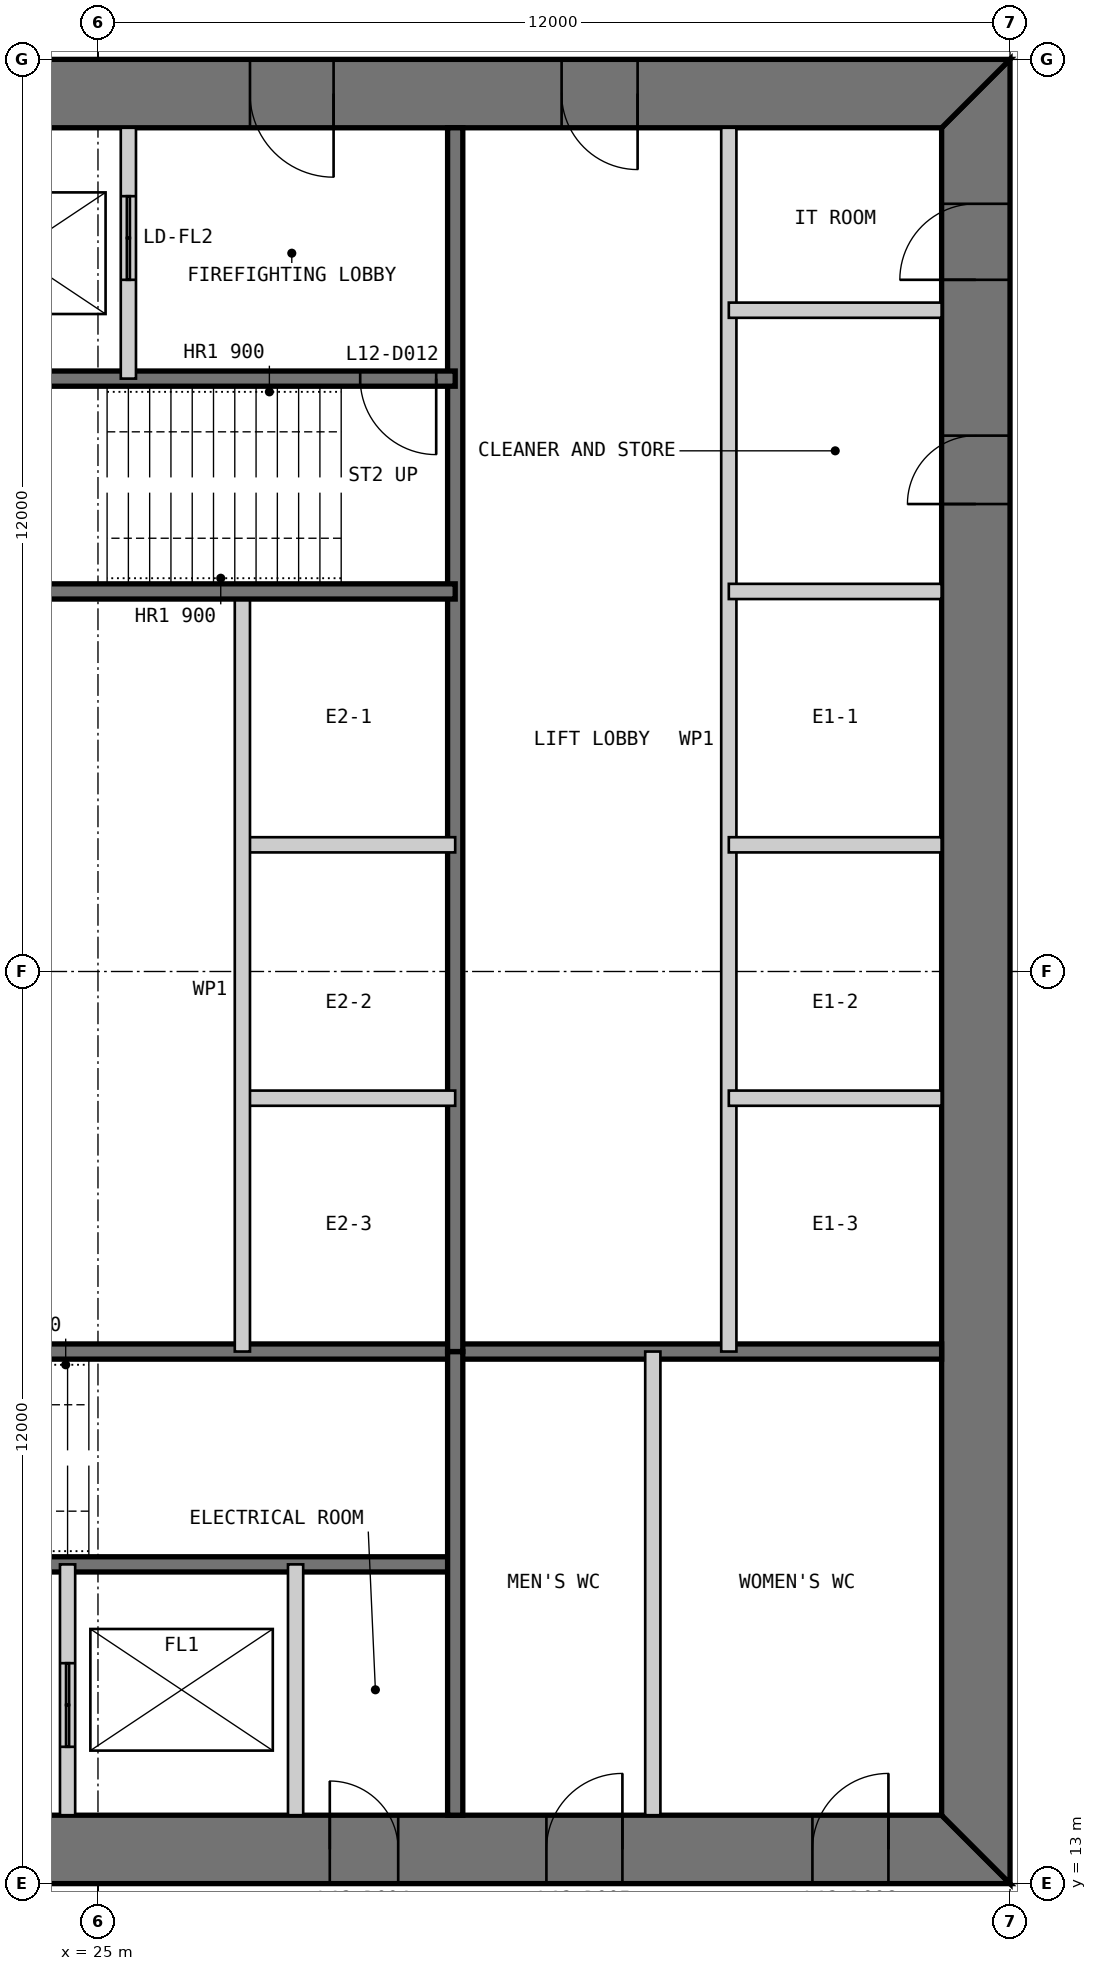
"""IFC4 building model, lengths in metres.
Left out: names, types, materials, properties, quantities, classifications, styles, units other than length and angle.
Written with IfcOpenShell. Run it as: python <this file> out.ifc"""

import sys

from ifc_helpers import new_model, si_unit, direction, frame, frame_2d, origin, place, context, subcontext, project, spatial, polyline, rectangle, outline, extrude, element, fill, save


model = new_model("IFC4")
c1 = context("Model", 3, precision=1e-05, world=origin(), true_north=direction((0.0, 1.0)))
c2 = subcontext(c1, "Body", "Model", "MODEL_VIEW")
j1 = project(units=[si_unit("LENGTHUNIT", "METRE"), si_unit("PLANEANGLEUNIT", "RADIAN")], contexts=[c1])
p1 = place(None, origin())
s1 = spatial("IfcSite", under=j1, at=p1, CompositionType="ELEMENT")
p2 = place(p1, origin())
s2 = spatial("IfcBuilding", under=s1, at=p2, CompositionType="ELEMENT")
p3 = place(p2, frame((0.0, 0.0, 55.0)))
s3 = spatial("IfcBuildingStorey", under=s2, at=p3, CompositionType="ELEMENT", Elevation=55.0)
p4 = place(p3, frame((13.0, 13.45, 0.0), z_axis=(0.0, 0.0, 1.0), x_axis=(1.0, 0.0, 0.0)))
e1 = element("IfcWall", 1, at=p4, inside=s3, PredefinedType="SHEAR", context=c2, shape_type="SweptSolid", body=[
    extrude(outline(polyline([(0.0, -0.45), (24.0, -0.45), (23.1, 0.45), (0.9, 0.45), (0.0, -0.45)])), origin(), (0.0, 0.0, 1.0), 4.0),
])
p5 = place(p4, frame((4.9, 0.0, 0.0)))
e2 = element("IfcOpeningElement", 2, at=p5, cuts=e1, PredefinedType="OPENING", context=c2, shape_type="SweptSolid", body=[
    extrude(rectangle(XDim=1.0, YDim=2.2, at=frame_2d((0.5, 1.1))), frame((0.0, 0.46, 0.0), z_axis=(0.0, -1.0, 0.0), x_axis=(1.0, 0.0, 0.0)), (0.0, 0.0, 1.0), 0.92),
])
p6 = place(p4, frame((8.9, 0.0, 0.0)))
e3 = element("IfcOpeningElement", 3, at=p6, cuts=e1, PredefinedType="OPENING", context=c2, shape_type="SweptSolid", body=[
    extrude(rectangle(XDim=1.1, YDim=2.2, at=frame_2d((0.55, 1.1))), frame((0.0, 0.46, 0.0), z_axis=(0.0, -1.0, 0.0), x_axis=(1.0, 0.0, 0.0)), (0.0, 0.0, 1.0), 0.92),
])
p7 = place(p4, frame((15.05, 0.0, 0.0)))
e4 = element("IfcOpeningElement", 4, at=p7, cuts=e1, PredefinedType="OPENING", context=c2, shape_type="SweptSolid", body=[
    extrude(rectangle(XDim=0.9, YDim=2.2, at=frame_2d((0.45, 1.1))), frame((0.0, 0.46, 0.0), z_axis=(0.0, -1.0, 0.0), x_axis=(1.0, 0.0, 0.0)), (0.0, 0.0, 1.0), 0.92),
])
p8 = place(p4, frame((17.9, 0.0, 0.0)))
e5 = element("IfcOpeningElement", 5, at=p8, cuts=e1, PredefinedType="OPENING", context=c2, shape_type="SweptSolid", body=[
    extrude(rectangle(XDim=1.0, YDim=2.2, at=frame_2d((0.5, 1.1))), frame((0.0, 0.46, 0.0), z_axis=(0.0, -1.0, 0.0), x_axis=(1.0, 0.0, 0.0)), (0.0, 0.0, 1.0), 0.92),
])
p9 = place(p4, frame((21.4, 0.0, 0.0)))
e6 = element("IfcOpeningElement", 6, at=p9, cuts=e1, PredefinedType="OPENING", context=c2, shape_type="SweptSolid", body=[
    extrude(rectangle(XDim=1.0, YDim=2.2, at=frame_2d((0.5, 1.1))), frame((0.0, 0.46, 0.0), z_axis=(0.0, -1.0, 0.0), x_axis=(1.0, 0.0, 0.0)), (0.0, 0.0, 1.0), 0.92),
])
p10 = place(p3, frame((36.55, 13.9, 0.0), z_axis=(0.0, 0.0, 1.0), x_axis=(0.0, 1.0, 0.0)))
e7 = element("IfcWall", 7, at=p10, inside=s3, PredefinedType="SHEAR", context=c2, shape_type="SweptSolid", body=[
    extrude(outline(polyline([(-0.9, -0.45), (23.1, -0.45), (22.2, 0.45), (0.0, 0.45), (-0.9, -0.45)])), origin(), (0.0, 0.0, 1.0), 4.0),
])
p11 = place(p10, frame((20.2, 0.0, 0.0)))
e8 = element("IfcOpeningElement", 8, at=p11, cuts=e7, PredefinedType="OPENING", context=c2, shape_type="SweptSolid", body=[
    extrude(rectangle(XDim=1.0, YDim=2.2, at=frame_2d((0.5, 1.1))), frame((0.0, 0.46, 0.0), z_axis=(0.0, -1.0, 0.0), x_axis=(1.0, 0.0, 0.0)), (0.0, 0.0, 1.0), 0.92),
])
p12 = place(p10, frame((17.25, 0.0, 0.0)))
e9 = element("IfcOpeningElement", 9, at=p12, cuts=e7, PredefinedType="OPENING", context=c2, shape_type="SweptSolid", body=[
    extrude(rectangle(XDim=0.9, YDim=2.2, at=frame_2d((0.45, 1.1))), frame((0.0, 0.46, 0.0), z_axis=(0.0, -1.0, 0.0), x_axis=(1.0, 0.0, 0.0)), (0.0, 0.0, 1.0), 0.92),
])
p13 = place(p3, frame((37.0, 36.55, 0.0), z_axis=(0.0, 0.0, 1.0), x_axis=(-1.0, 0.0, 0.0)))
e10 = element("IfcWall", 10, at=p13, inside=s3, PredefinedType="SHEAR", context=c2, shape_type="SweptSolid", body=[
    extrude(outline(polyline([(0.0, -0.45), (24.0, -0.45), (23.1, 0.45), (0.9, 0.45), (0.0, -0.45)])), origin(), (0.0, 0.0, 1.0), 4.0),
])
p14 = place(p13, frame((4.9, 0.0, 0.0)))
e11 = element("IfcOpeningElement", 11, at=p14, cuts=e10, PredefinedType="OPENING", context=c2, shape_type="SweptSolid", body=[
    extrude(rectangle(XDim=1.0, YDim=2.2, at=frame_2d((0.5, 1.1))), frame((0.0, 0.46, 0.0), z_axis=(0.0, -1.0, 0.0), x_axis=(1.0, 0.0, 0.0)), (0.0, 0.0, 1.0), 0.92),
])
p15 = place(p13, frame((8.9, 0.0, 0.0)))
e12 = element("IfcOpeningElement", 12, at=p15, cuts=e10, PredefinedType="OPENING", context=c2, shape_type="SweptSolid", body=[
    extrude(rectangle(XDim=1.1, YDim=2.2, at=frame_2d((0.55, 1.1))), frame((0.0, 0.46, 0.0), z_axis=(0.0, -1.0, 0.0), x_axis=(1.0, 0.0, 0.0)), (0.0, 0.0, 1.0), 0.92),
])
p16 = place(p13, frame((15.05, 0.0, 0.0)))
e13 = element("IfcOpeningElement", 13, at=p16, cuts=e10, PredefinedType="OPENING", context=c2, shape_type="SweptSolid", body=[
    extrude(rectangle(XDim=0.9, YDim=2.2, at=frame_2d((0.45, 1.1))), frame((0.0, 0.46, 0.0), z_axis=(0.0, -1.0, 0.0), x_axis=(1.0, 0.0, 0.0)), (0.0, 0.0, 1.0), 0.92),
])
p17 = place(p13, frame((17.9, 0.0, 0.0)))
e14 = element("IfcOpeningElement", 14, at=p17, cuts=e10, PredefinedType="OPENING", context=c2, shape_type="SweptSolid", body=[
    extrude(rectangle(XDim=1.0, YDim=2.2, at=frame_2d((0.5, 1.1))), frame((0.0, 0.46, 0.0), z_axis=(0.0, -1.0, 0.0), x_axis=(1.0, 0.0, 0.0)), (0.0, 0.0, 1.0), 0.92),
])
p18 = place(p13, frame((21.4, 0.0, 0.0)))
e15 = element("IfcOpeningElement", 15, at=p18, cuts=e10, PredefinedType="OPENING", context=c2, shape_type="SweptSolid", body=[
    extrude(rectangle(XDim=1.0, YDim=2.2, at=frame_2d((0.5, 1.1))), frame((0.0, 0.46, 0.0), z_axis=(0.0, -1.0, 0.0), x_axis=(1.0, 0.0, 0.0)), (0.0, 0.0, 1.0), 0.92),
])
p19 = place(p3, frame((20.3, 17.2, 0.0), z_axis=(0.0, 0.0, 1.0), x_axis=(1.0, 0.0, 0.0)))
e16 = element("IfcWall", 16, at=p19, inside=s3, PredefinedType="SOLIDWALL", context=c2, shape_type="SweptSolid", body=[
    extrude(rectangle(XDim=9.4, YDim=0.2, at=frame_2d((4.7, 0.0))), origin(), (0.0, 0.0, 1.0), 3.8),
])
p20 = place(p19, frame((0.25, 0.0, 0.0)))
e17 = element("IfcOpeningElement", 17, at=p20, cuts=e16, PredefinedType="OPENING", context=c2, shape_type="SweptSolid", body=[
    extrude(rectangle(XDim=1.0, YDim=2.2, at=frame_2d((0.5, 1.1))), frame((0.0, 0.11, 0.0), z_axis=(0.0, -1.0, 0.0), x_axis=(1.0, 0.0, 0.0)), (0.0, 0.0, 1.0), 0.22),
])
p21 = place(p3, frame((20.3, 20.0, 0.0), z_axis=(0.0, 0.0, 1.0), x_axis=(1.0, 0.0, 0.0)))
e18 = element("IfcWall", 18, at=p21, inside=s3, PredefinedType="SOLIDWALL", context=c2, shape_type="SweptSolid", body=[
    extrude(rectangle(XDim=15.8, YDim=0.2, at=frame_2d((7.9, 0.0))), origin(), (0.0, 0.0, 1.0), 3.8),
])
p22 = place(p3, frame((24.6, 13.9, 0.0), z_axis=(0.0, 0.0, 1.0), x_axis=(0.0, 1.0, 0.0)))
e19 = element("IfcWall", 19, at=p22, inside=s3, PredefinedType="PARTITIONING", context=c2, shape_type="SweptSolid", body=[
    extrude(rectangle(XDim=3.3, YDim=0.2, at=frame_2d((1.65, 0.0))), origin(), (0.0, 0.0, 1.0), 3.8),
])
p23 = place(p22, frame((0.9, 0.0, 0.0)))
e20 = element("IfcOpeningElement", 20, at=p23, cuts=e19, PredefinedType="OPENING", context=c2, shape_type="SweptSolid", body=[
    extrude(rectangle(XDim=1.1, YDim=2.2, at=frame_2d((0.55, 1.1))), frame((0.0, 0.11, 0.0), z_axis=(0.0, -1.0, 0.0), x_axis=(1.0, 0.0, 0.0)), (0.0, 0.0, 1.0), 0.22),
])
p24 = place(p3, frame((27.6, 13.9, 0.0), z_axis=(0.0, 0.0, 1.0), x_axis=(0.0, 1.0, 0.0)))
e21 = element("IfcWall", 21, at=p24, inside=s3, PredefinedType="PARTITIONING", context=c2, shape_type="SweptSolid", body=[
    extrude(rectangle(XDim=3.3, YDim=0.2, at=frame_2d((1.65, 0.0))), origin(), (0.0, 0.0, 1.0), 3.8),
])
p25 = place(p3, frame((29.7, 13.9, 0.0), z_axis=(0.0, 0.0, 1.0), x_axis=(0.0, 1.0, 0.0)))
e22 = element("IfcWall", 22, at=p25, inside=s3, PredefinedType="SOLIDWALL", context=c2, shape_type="SweptSolid", body=[
    extrude(rectangle(XDim=6.1, YDim=0.2, at=frame_2d((3.05, 0.0))), origin(), (0.0, 0.0, 1.0), 3.8),
])
p26 = place(p3, frame((32.3, 13.9, 0.0), z_axis=(0.0, 0.0, 1.0), x_axis=(0.0, 1.0, 0.0)))
e23 = element("IfcWall", 23, at=p26, inside=s3, PredefinedType="PARTITIONING", context=c2, shape_type="SweptSolid", body=[
    extrude(rectangle(XDim=6.1, YDim=0.2, at=frame_2d((3.05, 0.0))), origin(), (0.0, 0.0, 1.0), 3.8),
])
p27 = place(p3, frame((33.3, 36.1, 0.0), z_axis=(0.0, 0.0, 1.0), x_axis=(0.0, -1.0, 0.0)))
e24 = element("IfcWall", 24, at=p27, inside=s3, PredefinedType="PARTITIONING", context=c2, shape_type="SweptSolid", body=[
    extrude(rectangle(XDim=16.1, YDim=0.2, at=frame_2d((8.05, 0.0))), origin(), (0.0, 0.0, 1.0), 3.8),
])
p28 = place(p3, frame((29.7, 36.1, 0.0), z_axis=(0.0, 0.0, 1.0), x_axis=(0.0, -1.0, 0.0)))
e25 = element("IfcWall", 25, at=p28, inside=s3, PredefinedType="SOLIDWALL", context=c2, shape_type="SweptSolid", body=[
    extrude(rectangle(XDim=16.1, YDim=0.2, at=frame_2d((8.05, 0.0))), origin(), (0.0, 0.0, 1.0), 3.8),
])
for number, where, z_axis, x_axis in (
    (26, (36.1, 30.0, 0.0), (0.0, 0.0, 1.0), (-1.0, 0.0, 0.0)),
    (27, (36.1, 26.667, 0.0), (0.0, 0.0, 1.0), (-1.0, 0.0, 0.0)),
    (28, (36.1, 23.333, 0.0), (0.0, 0.0, 1.0), (-1.0, 0.0, 0.0)),
    (29, (29.7, 26.667, 0.0), (0.0, 0.0, 1.0), (-1.0, 0.0, 0.0)),
    (30, (29.7, 23.333, 0.0), (0.0, 0.0, 1.0), (-1.0, 0.0, 0.0)),
):
    element("IfcWall", number, at=place(p3, frame(where, z_axis=z_axis, x_axis=x_axis)), inside=s3, PredefinedType="PARTITIONING", context=c2, shape_type="SweptSolid", body=[
        extrude(rectangle(XDim=2.8, YDim=0.2, at=frame_2d((1.4, 0.0))), origin(), (0.0, 0.0, 1.0), 3.8),
    ])
p29 = place(p3, frame((26.9, 30.0, 0.0), z_axis=(0.0, 0.0, 1.0), x_axis=(0.0, -1.0, 0.0)))
e31 = element("IfcWall", 31, at=p29, inside=s3, PredefinedType="PARTITIONING", context=c2, shape_type="SweptSolid", body=[
    extrude(rectangle(XDim=10.0, YDim=0.2, at=frame_2d((5.0, 0.0))), origin(), (0.0, 0.0, 1.0), 3.8),
])
p30 = place(p3, frame((29.7, 32.8, 0.0), z_axis=(0.0, 0.0, 1.0), x_axis=(-1.0, 0.0, 0.0)))
e32 = element("IfcWall", 32, at=p30, inside=s3, PredefinedType="SOLIDWALL", context=c2, shape_type="SweptSolid", body=[
    extrude(rectangle(XDim=9.4, YDim=0.2, at=frame_2d((4.7, 0.0))), origin(), (0.0, 0.0, 1.0), 3.8),
])
p31 = place(p30, frame((0.25, 0.0, 0.0)))
e33 = element("IfcOpeningElement", 33, at=p31, cuts=e32, PredefinedType="OPENING", context=c2, shape_type="SweptSolid", body=[
    extrude(rectangle(XDim=1.0, YDim=2.2, at=frame_2d((0.5, 1.1))), frame((0.0, 0.11, 0.0), z_axis=(0.0, -1.0, 0.0), x_axis=(1.0, 0.0, 0.0)), (0.0, 0.0, 1.0), 0.22),
])
p32 = place(p3, frame((29.7, 30.0, 0.0), z_axis=(0.0, 0.0, 1.0), x_axis=(-1.0, 0.0, 0.0)))
e34 = element("IfcWall", 34, at=p32, inside=s3, PredefinedType="SOLIDWALL", context=c2, shape_type="SweptSolid", body=[
    extrude(rectangle(XDim=15.8, YDim=0.2, at=frame_2d((7.9, 0.0))), origin(), (0.0, 0.0, 1.0), 3.8),
])
p33 = place(p3, frame((25.4, 36.1, 0.0), z_axis=(0.0, 0.0, 1.0), x_axis=(0.0, -1.0, 0.0)))
e35 = element("IfcWall", 35, at=p33, inside=s3, PredefinedType="PARTITIONING", context=c2, shape_type="SweptSolid", body=[
    extrude(rectangle(XDim=3.3, YDim=0.2, at=frame_2d((1.65, 0.0))), origin(), (0.0, 0.0, 1.0), 3.8),
])
p34 = place(p33, frame((0.9, 0.0, 0.0)))
e36 = element("IfcOpeningElement", 36, at=p34, cuts=e35, PredefinedType="OPENING", context=c2, shape_type="SweptSolid", body=[
    extrude(rectangle(XDim=1.1, YDim=2.2, at=frame_2d((0.55, 1.1))), frame((0.0, 0.11, 0.0), z_axis=(0.0, -1.0, 0.0), x_axis=(1.0, 0.0, 0.0)), (0.0, 0.0, 1.0), 0.22),
])
p35 = place(p3, frame((36.1, 33.7, 0.0), z_axis=(0.0, 0.0, 1.0), x_axis=(-1.0, 0.0, 0.0)))
e37 = element("IfcWall", 37, at=p35, inside=s3, PredefinedType="PARTITIONING", context=c2, shape_type="SweptSolid", body=[
    extrude(rectangle(XDim=2.8, YDim=0.2, at=frame_2d((1.4, 0.0))), origin(), (0.0, 0.0, 1.0), 3.8),
])
p36 = place(p7, origin())
e38 = element("IfcDoor", 38, at=p36, inside=s3, OperationType="SINGLE_SWING_LEFT", PredefinedType="DOOR", context=c2, shape_type="SweptSolid", body=[
    extrude(rectangle(XDim=0.9, YDim=2.2, at=frame_2d((0.45, 1.1))), frame((0.0, 0.025, 0.0), z_axis=(0.0, -1.0, 0.0), x_axis=(1.0, 0.0, 0.0)), (0.0, 0.0, 1.0), 0.05),
    extrude(outline(polyline([(0.0, 0.0), (0.04, 0.0), (0.04, 2.16), (0.86, 2.16), (0.86, 0.0), (0.9, 0.0), (0.9, 2.2), (0.0, 2.2), (0.0, 0.0)])), frame((0.0, 0.3, 0.0), z_axis=(0.0, -1.0, 0.0), x_axis=(1.0, 0.0, 0.0)), (0.0, 0.0, 1.0), 0.6),
])
fill(e4, e38)
p37 = place(p8, origin())
e39 = element("IfcDoor", 39, at=p37, inside=s3, OperationType="SINGLE_SWING_RIGHT", PredefinedType="DOOR", context=c2, shape_type="SweptSolid", body=[
    extrude(rectangle(XDim=1.0, YDim=2.2, at=frame_2d((0.5, 1.1))), frame((0.0, 0.025, 0.0), z_axis=(0.0, -1.0, 0.0), x_axis=(1.0, 0.0, 0.0)), (0.0, 0.0, 1.0), 0.05),
    extrude(outline(polyline([(0.0, 0.0), (0.04, 0.0), (0.04, 2.16), (0.96, 2.16), (0.96, 0.0), (1.0, 0.0), (1.0, 2.2), (0.0, 2.2), (0.0, 0.0)])), frame((0.0, 0.3, 0.0), z_axis=(0.0, -1.0, 0.0), x_axis=(1.0, 0.0, 0.0)), (0.0, 0.0, 1.0), 0.6),
])
fill(e5, e39)
p38 = place(p9, origin())
e40 = element("IfcDoor", 40, at=p38, inside=s3, OperationType="SINGLE_SWING_RIGHT", PredefinedType="DOOR", context=c2, shape_type="SweptSolid", body=[
    extrude(rectangle(XDim=1.0, YDim=2.2, at=frame_2d((0.5, 1.1))), frame((0.0, 0.025, 0.0), z_axis=(0.0, -1.0, 0.0), x_axis=(1.0, 0.0, 0.0)), (0.0, 0.0, 1.0), 0.05),
    extrude(outline(polyline([(0.0, 0.0), (0.04, 0.0), (0.04, 2.16), (0.96, 2.16), (0.96, 0.0), (1.0, 0.0), (1.0, 2.2), (0.0, 2.2), (0.0, 0.0)])), frame((0.0, 0.3, 0.0), z_axis=(0.0, -1.0, 0.0), x_axis=(1.0, 0.0, 0.0)), (0.0, 0.0, 1.0), 0.6),
])
fill(e6, e40)
p39 = place(p14, origin())
e41 = element("IfcDoor", 41, at=p39, inside=s3, OperationType="SINGLE_SWING_LEFT", PredefinedType="DOOR", context=c2, shape_type="SweptSolid", body=[
    extrude(rectangle(XDim=1.0, YDim=2.2, at=frame_2d((0.5, 1.1))), frame((0.0, 0.025, 0.0), z_axis=(0.0, -1.0, 0.0), x_axis=(1.0, 0.0, 0.0)), (0.0, 0.0, 1.0), 0.05),
    extrude(outline(polyline([(0.0, 0.0), (0.04, 0.0), (0.04, 2.16), (0.96, 2.16), (0.96, 0.0), (1.0, 0.0), (1.0, 2.2), (0.0, 2.2), (0.0, 0.0)])), frame((0.0, 0.3, 0.0), z_axis=(0.0, -1.0, 0.0), x_axis=(1.0, 0.0, 0.0)), (0.0, 0.0, 1.0), 0.6),
])
fill(e11, e41)
p40 = place(p15, origin())
e42 = element("IfcDoor", 42, at=p40, inside=s3, OperationType="SINGLE_SWING_LEFT", PredefinedType="DOOR", context=c2, shape_type="SweptSolid", body=[
    extrude(rectangle(XDim=1.1, YDim=2.2, at=frame_2d((0.55, 1.1))), frame((0.0, 0.025, 0.0), z_axis=(0.0, -1.0, 0.0), x_axis=(1.0, 0.0, 0.0)), (0.0, 0.0, 1.0), 0.05),
    extrude(outline(polyline([(0.0, 0.0), (0.04, 0.0), (0.04, 2.16), (1.06, 2.16), (1.06, 0.0), (1.1, 0.0), (1.1, 2.2), (0.0, 2.2), (0.0, 0.0)])), frame((0.0, 0.3, 0.0), z_axis=(0.0, -1.0, 0.0), x_axis=(1.0, 0.0, 0.0)), (0.0, 0.0, 1.0), 0.6),
])
fill(e12, e42)
p41 = place(p31, origin())
e43 = element("IfcDoor", 43, at=p41, inside=s3, OperationType="SINGLE_SWING_LEFT", PredefinedType="DOOR", context=c2, shape_type="SweptSolid", body=[
    extrude(rectangle(XDim=1.0, YDim=2.2, at=frame_2d((0.5, 1.1))), frame((0.0, 0.025, 0.0), z_axis=(0.0, -1.0, 0.0), x_axis=(1.0, 0.0, 0.0)), (0.0, 0.0, 1.0), 0.05),
])
fill(e33, e43)
p42 = place(p11, origin())
e44 = element("IfcDoor", 44, at=p42, inside=s3, OperationType="SINGLE_SWING_LEFT", PredefinedType="DOOR", context=c2, shape_type="SweptSolid", body=[
    extrude(rectangle(XDim=1.0, YDim=2.2, at=frame_2d((0.5, 1.1))), frame((0.0, 0.025, 0.0), z_axis=(0.0, -1.0, 0.0), x_axis=(1.0, 0.0, 0.0)), (0.0, 0.0, 1.0), 0.05),
    extrude(outline(polyline([(0.0, 0.0), (0.04, 0.0), (0.04, 2.16), (0.96, 2.16), (0.96, 0.0), (1.0, 0.0), (1.0, 2.2), (0.0, 2.2), (0.0, 0.0)])), frame((0.0, 0.3, 0.0), z_axis=(0.0, -1.0, 0.0), x_axis=(1.0, 0.0, 0.0)), (0.0, 0.0, 1.0), 0.6),
])
fill(e8, e44)
p43 = place(p12, origin())
e45 = element("IfcDoor", 45, at=p43, inside=s3, OperationType="SINGLE_SWING_LEFT", PredefinedType="DOOR", context=c2, shape_type="SweptSolid", body=[
    extrude(rectangle(XDim=0.9, YDim=2.2, at=frame_2d((0.45, 1.1))), frame((0.0, 0.025, 0.0), z_axis=(0.0, -1.0, 0.0), x_axis=(1.0, 0.0, 0.0)), (0.0, 0.0, 1.0), 0.05),
    extrude(outline(polyline([(0.0, 0.0), (0.04, 0.0), (0.04, 2.16), (0.86, 2.16), (0.86, 0.0), (0.9, 0.0), (0.9, 2.2), (0.0, 2.2), (0.0, 0.0)])), frame((0.0, 0.3, 0.0), z_axis=(0.0, -1.0, 0.0), x_axis=(1.0, 0.0, 0.0)), (0.0, 0.0, 1.0), 0.6),
])
fill(e9, e45)
p44 = place(p23, origin())
e46 = element("IfcDoor", 46, at=p44, inside=s3, OperationType="DOUBLE_DOOR_SLIDING", PredefinedType="DOOR", context=c2, shape_type="SweptSolid", body=[
    extrude(rectangle(XDim=1.1, YDim=2.2, at=frame_2d((0.55, 1.1))), frame((0.0, 0.025, 0.0), z_axis=(0.0, -1.0, 0.0), x_axis=(1.0, 0.0, 0.0)), (0.0, 0.0, 1.0), 0.05),
])
fill(e20, e46)
p45 = place(p34, origin())
e47 = element("IfcDoor", 47, at=p45, inside=s3, OperationType="DOUBLE_DOOR_SLIDING", PredefinedType="DOOR", context=c2, shape_type="SweptSolid", body=[
    extrude(rectangle(XDim=1.1, YDim=2.2, at=frame_2d((0.55, 1.1))), frame((0.0, 0.025, 0.0), z_axis=(0.0, -1.0, 0.0), x_axis=(1.0, 0.0, 0.0)), (0.0, 0.0, 1.0), 0.05),
])
fill(e36, e47)
save(model, sys.argv[1])
